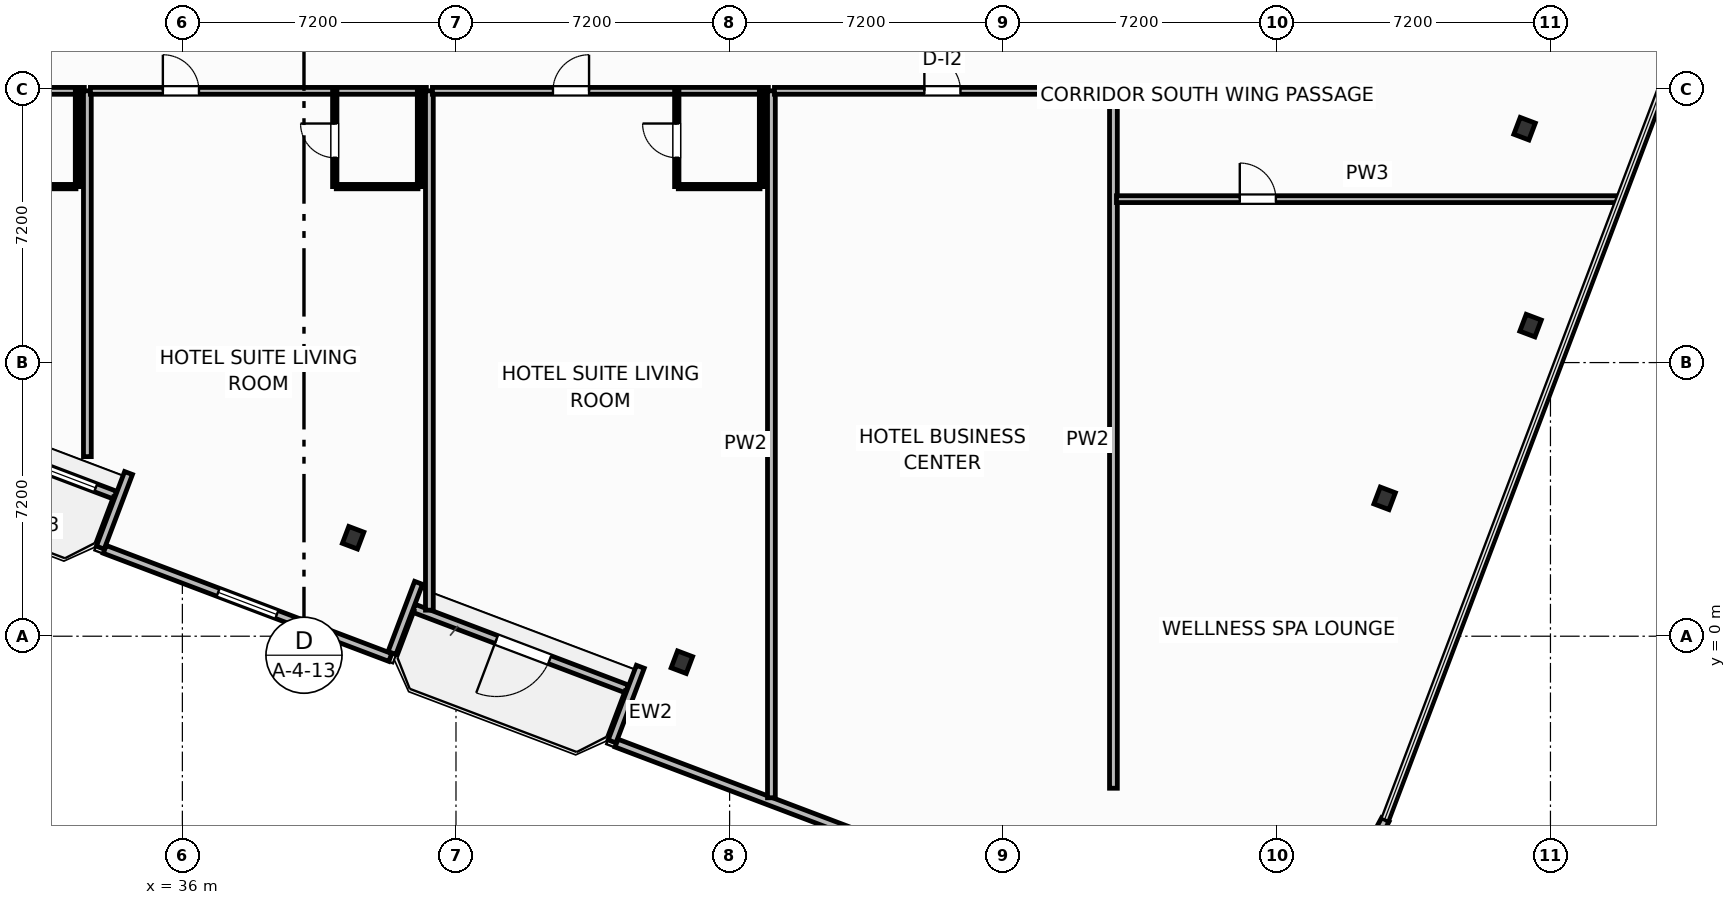
"""IFC4 building model, lengths in metres.
Left out: names, types, materials, properties, quantities, classifications, styles, units other than length and angle.
Written with IfcOpenShell. Run it as: python <this file> out.ifc"""

import sys

from ifc_helpers import new_model, si_unit, direction, frame, frame_2d, origin, origin_2d, place, context, subcontext, project, spatial, rectangle, i_section, extrude, element, fill, save


model = new_model("IFC4")
c1 = context("Model", 3, precision=1e-05, world=origin(), true_north=direction((0.0, 1.0)))
c2 = subcontext(c1, "Body", "Model", "MODEL_VIEW")
j1 = project(units=[si_unit("LENGTHUNIT", "METRE"), si_unit("PLANEANGLEUNIT", "RADIAN")], contexts=[c1])
p1 = place(None, origin())
s1 = spatial("IfcSite", under=j1, at=p1, CompositionType="ELEMENT")
p2 = place(p1, origin())
s2 = spatial("IfcBuilding", under=s1, at=p2, CompositionType="ELEMENT")
p3 = place(p2, frame((0.0, 0.0, 113.2)))
s3 = spatial("IfcBuildingStorey", under=s2, at=p3, CompositionType="ELEMENT", Elevation=113.2)
for number, where, z_axis, x_axis in (
    (1, (40.493, 2.591, 0.0), (0.0, 0.0, 1.0), (0.935, -0.354, 0.0)),
    (2, (49.144, -0.684, 0.0), (0.0, 0.0, 1.0), (0.935, -0.354, 0.0)),
    (3, (67.637, 3.628, 0.0), (0.0, 0.0, 1.0), (0.935, -0.354, 0.0)),
    (4, (71.477, 8.173, 0.0), (0.0, 0.0, 1.0), (0.935, -0.354, 0.0)),
    (5, (71.319, 13.354, 0.0), (0.0, 0.0, 1.0), (0.935, -0.354, 0.0)),
):
    element("IfcColumn", number, at=place(p3, frame(where, z_axis=z_axis, x_axis=x_axis)), inside=s3, PredefinedType="COLUMN", context=c2, shape_type="SweptSolid", body=[
        extrude(i_section(OverallWidth=0.424, OverallDepth=0.474, WebThickness=0.048, FlangeThickness=0.077, FilletRadius=0.025, at=origin_2d()), origin(), (0.0, 0.0, 1.0), 3.7),
    ])
p4 = place(p3, frame((34.234, 3.71, 0.0), z_axis=(0.0, 0.0, 1.0), x_axis=(-0.935222539288, 0.354060449652, 0.0)))
e6 = element("IfcWall", 6, at=p4, inside=s3, PredefinedType="SOLIDWALL", context=c2, shape_type="SweptSolid", body=[
    extrude(rectangle(XDim=6.0, YDim=0.22, at=frame_2d((3.0, 0.0))), origin(), (0.0, 0.0, 1.0), 2.66),
])
p5 = place(p4, frame((3.508, 0.0, 0.0)))
e7 = element("IfcOpeningElement", 7, at=p5, cuts=e6, PredefinedType="OPENING", context=c2, shape_type="SweptSolid", body=[
    extrude(rectangle(XDim=1.5, YDim=2.25, at=frame_2d((0.75, 1.125))), frame((0.0, 0.12, 0.0), z_axis=(0.0, -1.0, 0.0), x_axis=(1.0, 0.0, 0.0)), (0.0, 0.0, 1.0), 0.24),
])
p6 = place(p4, frame((0.55, 0.0, 0.75)))
e8 = element("IfcOpeningElement", 8, at=p6, cuts=e6, PredefinedType="OPENING", context=c2, shape_type="SweptSolid", body=[
    extrude(rectangle(XDim=1.65, YDim=1.65, at=frame_2d((0.825, 0.825))), frame((0.0, 0.12, 0.0), z_axis=(0.0, -1.0, 0.0), x_axis=(1.0, 0.0, 0.0)), (0.0, 0.0, 1.0), 0.24),
])
p7 = place(p3, frame((47.701, -1.389, 0.0), z_axis=(0.0, 0.0, 1.0), x_axis=(-0.93521416643, 0.354082565101, 0.0)))
e9 = element("IfcWall", 9, at=p7, inside=s3, PredefinedType="SOLIDWALL", context=c2, shape_type="SweptSolid", body=[
    extrude(rectangle(XDim=6.0, YDim=0.22, at=frame_2d((3.0, 0.0))), origin(), (0.0, 0.0, 1.0), 2.66),
])
p8 = place(p7, frame((2.176, 0.0, 0.0)))
e10 = element("IfcOpeningElement", 10, at=p8, cuts=e9, PredefinedType="OPENING", context=c2, shape_type="SweptSolid", body=[
    extrude(rectangle(XDim=1.5, YDim=2.25, at=frame_2d((0.75, 1.125))), frame((0.0, 0.12, 0.0), z_axis=(0.0, -1.0, 0.0), x_axis=(1.0, 0.0, 0.0)), (0.0, 0.0, 1.0), 0.24),
])
p9 = place(p3, frame((34.583, 4.294, 0.0), z_axis=(0.0, 0.0, 1.0), x_axis=(-0.354128469405, -0.935196785258, 0.0)))
e11 = element("IfcWall", 11, at=p9, inside=s3, PredefinedType="SOLIDWALL", context=c2, shape_type="SweptSolid", body=[
    extrude(rectangle(XDim=2.1, YDim=0.22, at=frame_2d((1.05, 0.0))), origin(), (0.0, 0.0, 1.0), 2.66),
])
p10 = place(p3, frame((33.957, 2.286, 0.0), z_axis=(0.0, 0.0, 1.0), x_axis=(0.935220736163, -0.354065212427, 0.0)))
e12 = element("IfcWall", 12, at=p10, inside=s3, PredefinedType="SOLIDWALL", context=c2, shape_type="SweptSolid", body=[
    extrude(rectangle(XDim=8.035, YDim=0.22, at=frame_2d((4.018, 0.0))), origin(), (0.0, 0.0, 1.0), 2.66),
])
p11 = place(p10, frame((3.192, 0.0, 0.8)))
e13 = element("IfcOpeningElement", 13, at=p11, cuts=e12, PredefinedType="OPENING", context=c2, shape_type="SweptSolid", body=[
    extrude(rectangle(XDim=1.65, YDim=1.65, at=frame_2d((0.825, 0.825))), frame((0.0, 0.12, 0.0), z_axis=(0.0, -1.0, 0.0), x_axis=(1.0, 0.0, 0.0)), (0.0, 0.0, 1.0), 0.24),
])
p12 = place(p3, frame((41.516, -0.442, 0.0), z_axis=(0.0, 0.0, 1.0), x_axis=(0.354061611705, 0.935222099352, 0.0)))
e14 = element("IfcWall", 14, at=p12, inside=s3, PredefinedType="SOLIDWALL", context=c2, shape_type="SweptSolid", body=[
    extrude(rectangle(XDim=1.975, YDim=0.22, at=frame_2d((0.987, 0.0))), origin(), (0.0, 0.0, 1.0), 2.66),
])
p13 = place(p3, frame((48.051, -0.805, 0.0), z_axis=(0.0, 0.0, 1.0), x_axis=(-0.353988291547, -0.935249854022, 0.0)))
e15 = element("IfcWall", 15, at=p13, inside=s3, PredefinedType="SOLIDWALL", context=c2, shape_type="SweptSolid", body=[
    extrude(rectangle(XDim=2.1, YDim=0.22, at=frame_2d((1.05, 0.0))), origin(), (0.0, 0.0, 1.0), 2.66),
])
p14 = place(p3, frame((47.424, -2.813, 0.0), z_axis=(0.0, 0.0, 1.0), x_axis=(0.935225962032, -0.354051408614, 0.0)))
e16 = element("IfcWall", 16, at=p14, inside=s3, PredefinedType="SOLIDWALL", context=c2, shape_type="SweptSolid", body=[
    extrude(rectangle(XDim=14.347, YDim=0.22, at=frame_2d((7.173, 0.0))), origin(), (0.0, 0.0, 1.0), 2.66),
])
p15 = place(p14, frame((6.348, 0.0, 0.8)))
e17 = element("IfcOpeningElement", 17, at=p15, cuts=e16, PredefinedType="OPENING", context=c2, shape_type="SweptSolid", body=[
    extrude(rectangle(XDim=1.65, YDim=1.65, at=frame_2d((0.825, 0.825))), frame((0.0, 0.12, 0.0), z_axis=(0.0, -1.0, 0.0), x_axis=(1.0, 0.0, 0.0)), (0.0, 0.0, 1.0), 0.24),
])
p16 = place(p3, frame((67.015, -6.019, 0.0), z_axis=(0.0, 0.0, 1.0), x_axis=(0.473077364598, 0.881020889142, 0.0)))
e18 = element("IfcWall", 18, at=p16, inside=s3, PredefinedType="SOLIDWALL", context=c2, shape_type="SweptSolid", body=[
    extrude(rectangle(XDim=1.353, YDim=0.22, at=frame_2d((0.677, 0.0))), origin(), (0.0, 0.0, 1.0), 2.66),
])
p17 = place(p3, frame((24.58, 14.35, 0.0), z_axis=(0.0, 0.0, 1.0), x_axis=(1.0, 0.0, 0.0)))
e19 = element("IfcWall", 19, at=p17, inside=s3, PredefinedType="PARTITIONING", context=c2, shape_type="SweptSolid", body=[
    extrude(rectangle(XDim=8.84, YDim=0.18, at=frame_2d((4.42, 0.0))), origin(), (0.0, 0.0, 1.0), 3.38),
])
p18 = place(p17, frame((4.68, 0.0, 0.0)))
e20 = element("IfcOpeningElement", 20, at=p18, cuts=e19, PredefinedType="OPENING", context=c2, shape_type="SweptSolid", body=[
    extrude(rectangle(XDim=0.95, YDim=2.15, at=frame_2d((0.475, 1.075))), frame((0.0, 0.1, 0.0), z_axis=(0.0, -1.0, 0.0), x_axis=(1.0, 0.0, 0.0)), (0.0, 0.0, 1.0), 0.2),
])
p19 = place(p3, frame((31.05, 11.83, 0.0), z_axis=(0.0, 0.0, 1.0), x_axis=(1.0, 0.0, 0.0)))
e21 = element("IfcWall", 21, at=p19, inside=s3, PredefinedType="PARTITIONING", context=c2, shape_type="SweptSolid", body=[
    extrude(rectangle(XDim=2.15, YDim=0.115, at=frame_2d((1.075, 0.0))), origin(), (0.0, 0.0, 1.0), 3.38),
])
p20 = place(p3, frame((33.24, 11.83, 0.0), z_axis=(0.0, 0.0, 1.0), x_axis=(0.0, 1.0, 0.0)))
e22 = element("IfcWall", 22, at=p20, inside=s3, PredefinedType="PARTITIONING", context=c2, shape_type="SweptSolid", body=[
    extrude(rectangle(XDim=2.52, YDim=0.115, at=frame_2d((1.26, 0.0))), origin(), (0.0, 0.0, 1.0), 1.165),
])
p21 = place(p3, frame((33.5, 4.725, 0.0), z_axis=(0.0, 0.0, 1.0), x_axis=(0.0, 1.0, 0.0)))
e23 = element("IfcWall", 23, at=p21, inside=s3, PredefinedType="PARTITIONING", context=c2, shape_type="SweptSolid", body=[
    extrude(rectangle(XDim=9.625, YDim=0.205, at=frame_2d((4.812, 0.0))), origin(), (0.0, 0.0, 1.0), 3.38),
])
p22 = place(p3, frame((33.58, 14.35, 0.0), z_axis=(0.0, 0.0, 1.0), x_axis=(1.0, 0.0, 0.0)))
e24 = element("IfcWall", 24, at=p22, inside=s3, PredefinedType="PARTITIONING", context=c2, shape_type="SweptSolid", body=[
    extrude(rectangle(XDim=8.84, YDim=0.18, at=frame_2d((4.42, 0.0))), origin(), (0.0, 0.0, 1.0), 3.38),
])
p23 = place(p22, frame((1.907, 0.0, 0.0)))
e25 = element("IfcOpeningElement", 25, at=p23, cuts=e24, PredefinedType="OPENING", context=c2, shape_type="SweptSolid", body=[
    extrude(rectangle(XDim=0.95, YDim=2.15, at=frame_2d((0.475, 1.075))), frame((0.0, 0.1, 0.0), z_axis=(0.0, -1.0, 0.0), x_axis=(1.0, 0.0, 0.0)), (0.0, 0.0, 1.0), 0.2),
])
p24 = place(p3, frame((40.05, 11.83, 0.0), z_axis=(0.0, 0.0, 1.0), x_axis=(1.0, 0.0, 0.0)))
e26 = element("IfcWall", 26, at=p24, inside=s3, PredefinedType="PARTITIONING", context=c2, shape_type="SweptSolid", body=[
    extrude(rectangle(XDim=2.15, YDim=0.115, at=frame_2d((1.075, 0.0))), origin(), (0.0, 0.0, 1.0), 3.38),
])
p25 = place(p3, frame((40.01, 11.83, 0.0), z_axis=(0.0, 0.0, 1.0), x_axis=(0.0, 1.0, 0.0)))
e27 = element("IfcWall", 27, at=p25, inside=s3, PredefinedType="PARTITIONING", context=c2, shape_type="SweptSolid", body=[
    extrude(rectangle(XDim=2.52, YDim=0.115, at=frame_2d((1.26, 0.0))), origin(), (0.0, 0.0, 1.0), 3.38),
])
p26 = place(p25, frame((0.76, 0.0, 0.0)))
e28 = element("IfcOpeningElement", 28, at=p26, cuts=e27, PredefinedType="OPENING", context=c2, shape_type="SweptSolid", body=[
    extrude(rectangle(XDim=0.9, YDim=2.05, at=frame_2d((0.45, 1.025))), frame((0.0, 0.067, 0.0), z_axis=(0.0, -1.0, 0.0), x_axis=(1.0, 0.0, 0.0)), (0.0, 0.0, 1.0), 0.135),
])
p27 = place(p3, frame((42.24, 11.83, 0.0), z_axis=(0.0, 0.0, 1.0), x_axis=(0.0, 1.0, 0.0)))
e29 = element("IfcWall", 29, at=p27, inside=s3, PredefinedType="PARTITIONING", context=c2, shape_type="SweptSolid", body=[
    extrude(rectangle(XDim=2.52, YDim=0.115, at=frame_2d((1.26, 0.0))), origin(), (0.0, 0.0, 1.0), 3.38),
])
p28 = place(p3, frame((42.5, 0.685, 0.0), z_axis=(0.0, 0.0, 1.0), x_axis=(0.0, 1.0, 0.0)))
e30 = element("IfcWall", 30, at=p28, inside=s3, PredefinedType="PARTITIONING", context=c2, shape_type="SweptSolid", body=[
    extrude(rectangle(XDim=13.665, YDim=0.205, at=frame_2d((6.833, 0.0))), origin(), (0.0, 0.0, 1.0), 1.165),
])
p29 = place(p3, frame((42.58, 14.35, 0.0), z_axis=(0.0, 0.0, 1.0), x_axis=(1.0, 0.0, 0.0)))
e31 = element("IfcWall", 31, at=p29, inside=s3, PredefinedType="PARTITIONING", context=c2, shape_type="SweptSolid", body=[
    extrude(rectangle(XDim=8.84, YDim=0.18, at=frame_2d((4.42, 0.0))), origin(), (0.0, 0.0, 1.0), 3.38),
])
p30 = place(p29, frame((3.172, 0.0, 0.0)))
e32 = element("IfcOpeningElement", 32, at=p30, cuts=e31, PredefinedType="OPENING", context=c2, shape_type="SweptSolid", body=[
    extrude(rectangle(XDim=0.95, YDim=2.15, at=frame_2d((0.475, 1.075))), frame((0.0, 0.1, 0.0), z_axis=(0.0, -1.0, 0.0), x_axis=(1.0, 0.0, 0.0)), (0.0, 0.0, 1.0), 0.2),
])
p31 = place(p3, frame((49.05, 11.83, 0.0), z_axis=(0.0, 0.0, 1.0), x_axis=(1.0, 0.0, 0.0)))
e33 = element("IfcWall", 33, at=p31, inside=s3, PredefinedType="PARTITIONING", context=c2, shape_type="SweptSolid", body=[
    extrude(rectangle(XDim=2.15, YDim=0.115, at=frame_2d((1.075, 0.0))), origin(), (0.0, 0.0, 1.0), 3.38),
])
p32 = place(p3, frame((49.01, 11.83, 0.0), z_axis=(0.0, 0.0, 1.0), x_axis=(0.0, 1.0, 0.0)))
e34 = element("IfcWall", 34, at=p32, inside=s3, PredefinedType="PARTITIONING", context=c2, shape_type="SweptSolid", body=[
    extrude(rectangle(XDim=2.52, YDim=0.115, at=frame_2d((1.26, 0.0))), origin(), (0.0, 0.0, 1.0), 3.38),
])
p33 = place(p32, frame((0.76, 0.0, 0.0)))
e35 = element("IfcOpeningElement", 35, at=p33, cuts=e34, PredefinedType="OPENING", context=c2, shape_type="SweptSolid", body=[
    extrude(rectangle(XDim=0.9, YDim=2.05, at=frame_2d((0.45, 1.025))), frame((0.0, 0.067, 0.0), z_axis=(0.0, -1.0, 0.0), x_axis=(1.0, 0.0, 0.0)), (0.0, 0.0, 1.0), 0.135),
])
p34 = place(p3, frame((51.24, 11.83, 0.0), z_axis=(0.0, 0.0, 1.0), x_axis=(0.0, 1.0, 0.0)))
e36 = element("IfcWall", 36, at=p34, inside=s3, PredefinedType="PARTITIONING", context=c2, shape_type="SweptSolid", body=[
    extrude(rectangle(XDim=2.52, YDim=0.115, at=frame_2d((1.26, 0.0))), origin(), (0.0, 0.0, 1.0), 3.38),
])
p35 = place(p3, frame((51.5, -4.251, 0.0), z_axis=(0.0, 0.0, 1.0), x_axis=(0.0, 1.0, 0.0)))
e37 = element("IfcWall", 37, at=p35, inside=s3, PredefinedType="PARTITIONING", context=c2, shape_type="SweptSolid", body=[
    extrude(rectangle(XDim=18.601, YDim=0.205, at=frame_2d((9.301, 0.0))), origin(), (0.0, 0.0, 1.0), 1.165),
])
p36 = place(p3, frame((51.58, 14.35, 0.0), z_axis=(0.0, 0.0, 1.0), x_axis=(1.0, 0.0, 0.0)))
e38 = element("IfcWall", 38, at=p36, inside=s3, PredefinedType="PARTITIONING", context=c2, shape_type="SweptSolid", body=[
    extrude(rectangle(XDim=8.84, YDim=0.18, at=frame_2d((4.42, 0.0))), origin(), (0.0, 0.0, 1.0), 3.38),
])
p37 = place(p36, frame((3.945, 0.0, 0.0)))
e39 = element("IfcOpeningElement", 39, at=p37, cuts=e38, PredefinedType="OPENING", context=c2, shape_type="SweptSolid", body=[
    extrude(rectangle(XDim=0.95, YDim=2.05, at=frame_2d((0.475, 1.025))), frame((0.0, 0.1, 0.0), z_axis=(0.0, -1.0, 0.0), x_axis=(1.0, 0.0, 0.0)), (0.0, 0.0, 1.0), 0.2),
])
p38 = place(p3, frame((60.5, -4.0, 0.0), z_axis=(0.0, 0.0, 1.0), x_axis=(0.0, 1.0, 0.0)))
e40 = element("IfcWall", 40, at=p38, inside=s3, PredefinedType="PARTITIONING", context=c2, shape_type="SweptSolid", body=[
    extrude(rectangle(XDim=18.35, YDim=0.205, at=frame_2d((9.175, 0.0))), origin(), (0.0, 0.0, 1.0), 3.38),
])
p39 = place(p3, frame((60.58, 11.5, 0.0), z_axis=(0.0, 0.0, 1.0), x_axis=(1.0, 0.0, 0.0)))
e41 = element("IfcWall", 41, at=p39, inside=s3, PredefinedType="PARTITIONING", context=c2, shape_type="SweptSolid", body=[
    extrude(rectangle(XDim=13.196, YDim=0.18, at=frame_2d((6.598, 0.0))), origin(), (0.0, 0.0, 1.0), 3.38),
])
p40 = place(p39, frame((3.245, 0.0, 0.0)))
e42 = element("IfcOpeningElement", 42, at=p40, cuts=e41, PredefinedType="OPENING", context=c2, shape_type="SweptSolid", body=[
    extrude(rectangle(XDim=0.95, YDim=2.05, at=frame_2d((0.475, 1.025))), frame((0.0, 0.1, 0.0), z_axis=(0.0, -1.0, 0.0), x_axis=(1.0, 0.0, 0.0)), (0.0, 0.0, 1.0), 0.2),
])
p41 = place(p6, origin())
e43 = element("IfcWindow", 43, at=p41, inside=s3, PartitioningType="SINGLE_PANEL", PredefinedType="WINDOW", context=c2, shape_type="SweptSolid", body=[
    extrude(rectangle(XDim=1.65, YDim=1.65, at=frame_2d((0.825, 0.825))), frame((0.0, 0.03, 0.0), z_axis=(0.0, -1.0, 0.0), x_axis=(1.0, 0.0, 0.0)), (0.0, 0.0, 1.0), 0.06),
])
fill(e8, e43)
p42 = place(p8, origin())
e44 = element("IfcDoor", 44, at=p42, inside=s3, OperationType="SINGLE_SWING_RIGHT", PredefinedType="DOOR", context=c2, shape_type="SweptSolid", body=[
    extrude(rectangle(XDim=1.5, YDim=2.25, at=frame_2d((0.75, 1.125))), frame((0.0, 0.025, 0.0), z_axis=(0.0, -1.0, 0.0), x_axis=(1.0, 0.0, 0.0)), (0.0, 0.0, 1.0), 0.05),
])
fill(e10, e44)
p43 = place(p11, origin())
e45 = element("IfcWindow", 45, at=p43, inside=s3, PartitioningType="SINGLE_PANEL", PredefinedType="WINDOW", context=c2, shape_type="SweptSolid", body=[
    extrude(rectangle(XDim=1.65, YDim=1.65, at=frame_2d((0.825, 0.825))), frame((0.0, 0.03, 0.0), z_axis=(0.0, -1.0, 0.0), x_axis=(1.0, 0.0, 0.0)), (0.0, 0.0, 1.0), 0.06),
])
fill(e13, e45)
p44 = place(p23, origin())
e46 = element("IfcDoor", 46, at=p44, inside=s3, OperationType="SINGLE_SWING_LEFT", PredefinedType="DOOR", context=c2, shape_type="SweptSolid", body=[
    extrude(rectangle(XDim=0.95, YDim=2.15, at=frame_2d((0.475, 1.075))), frame((0.0, 0.025, 0.0), z_axis=(0.0, -1.0, 0.0), x_axis=(1.0, 0.0, 0.0)), (0.0, 0.0, 1.0), 0.05),
])
fill(e25, e46)
p45 = place(p26, origin())
e47 = element("IfcDoor", 47, at=p45, inside=s3, OperationType="SINGLE_SWING_RIGHT", PredefinedType="DOOR", context=c2, shape_type="SweptSolid", body=[
    extrude(rectangle(XDim=0.9, YDim=2.05, at=frame_2d((0.45, 1.025))), frame((0.0, 0.025, 0.0), z_axis=(0.0, -1.0, 0.0), x_axis=(1.0, 0.0, 0.0)), (0.0, 0.0, 1.0), 0.05),
])
fill(e28, e47)
p46 = place(p30, origin())
e48 = element("IfcDoor", 48, at=p46, inside=s3, OperationType="SINGLE_SWING_RIGHT", PredefinedType="DOOR", context=c2, shape_type="SweptSolid", body=[
    extrude(rectangle(XDim=0.95, YDim=2.15, at=frame_2d((0.475, 1.075))), frame((0.0, 0.025, 0.0), z_axis=(0.0, -1.0, 0.0), x_axis=(1.0, 0.0, 0.0)), (0.0, 0.0, 1.0), 0.05),
])
fill(e32, e48)
p47 = place(p33, origin())
e49 = element("IfcDoor", 49, at=p47, inside=s3, OperationType="SINGLE_SWING_RIGHT", PredefinedType="DOOR", context=c2, shape_type="SweptSolid", body=[
    extrude(rectangle(XDim=0.9, YDim=2.05, at=frame_2d((0.45, 1.025))), frame((0.0, 0.025, 0.0), z_axis=(0.0, -1.0, 0.0), x_axis=(1.0, 0.0, 0.0)), (0.0, 0.0, 1.0), 0.05),
])
fill(e35, e49)
p48 = place(p37, origin())
e50 = element("IfcDoor", 50, at=p48, inside=s3, OperationType="SINGLE_SWING_LEFT", PredefinedType="DOOR", context=c2, shape_type="SweptSolid", body=[
    extrude(rectangle(XDim=0.95, YDim=2.05, at=frame_2d((0.475, 1.025))), frame((0.0, 0.025, 0.0), z_axis=(0.0, -1.0, 0.0), x_axis=(1.0, 0.0, 0.0)), (0.0, 0.0, 1.0), 0.05),
])
fill(e39, e50)
p49 = place(p40, origin())
e51 = element("IfcDoor", 51, at=p49, inside=s3, OperationType="SINGLE_SWING_LEFT", PredefinedType="DOOR", context=c2, shape_type="SweptSolid", body=[
    extrude(rectangle(XDim=0.95, YDim=2.05, at=frame_2d((0.475, 1.025))), frame((0.0, 0.025, 0.0), z_axis=(0.0, -1.0, 0.0), x_axis=(1.0, 0.0, 0.0)), (0.0, 0.0, 1.0), 0.05),
])
fill(e42, e51)
save(model, sys.argv[1])
